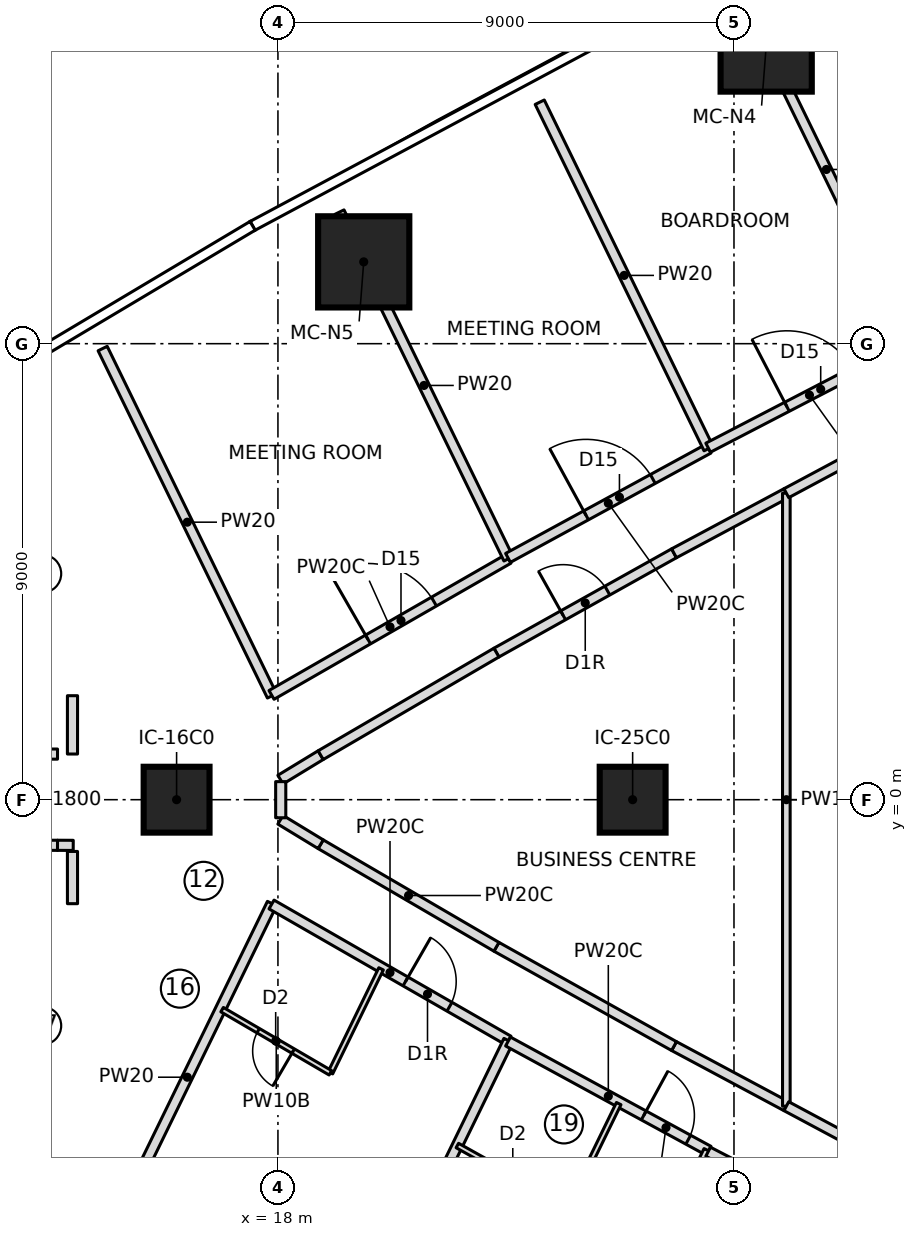
"""IFC4 building model, lengths in metres.
Left out: names, types, materials, properties, quantities, classifications, styles, units other than length and angle.
Written with IfcOpenShell. Run it as: python <this file> out.ifc"""

import sys

from ifc_helpers import new_model, si_unit, direction, frame, frame_2d, origin, origin_2d, place, context, subcontext, project, spatial, rectangle, extrude, element, fill, save


model = new_model("IFC4")
c1 = context("Model", 3, precision=1e-05, world=origin(), true_north=direction((0.0, 1.0)))
c2 = subcontext(c1, "Body", "Model", "MODEL_VIEW")
j1 = project(units=[si_unit("LENGTHUNIT", "METRE"), si_unit("PLANEANGLEUNIT", "RADIAN")], contexts=[c1])
p1 = place(None, origin())
s1 = spatial("IfcSite", under=j1, at=p1, CompositionType="ELEMENT")
p2 = place(p1, origin())
s2 = spatial("IfcBuilding", under=s1, at=p2, CompositionType="ELEMENT")
p3 = place(p2, frame((0.0, 0.0, 46.7)))
s3 = spatial("IfcBuildingStorey", under=s2, at=p3, CompositionType="ELEMENT", Elevation=46.7)
for number, where, z_axis, x_axis in (
    (1, (27.635, 14.874, 0.0), (0.0, 0.0, 1.0), (1.0, 0.0, 0.0)),
    (2, (19.693, 10.615, 0.0), (0.0, 0.0, 1.0), (1.0, 0.0, 0.0)),
):
    element("IfcColumn", number, at=place(p3, frame(where, z_axis=z_axis, x_axis=x_axis)), inside=s3, PredefinedType="COLUMN", context=c2, shape_type="SweptSolid", body=[
        extrude(rectangle(XDim=1.8, YDim=1.8, at=origin_2d()), origin(), (0.0, 0.0, 1.0), 3.55),
    ])
for number, where, z_axis, x_axis in (
    (3, (16.0, 0.0, 0.0), (0.0, 0.0, 1.0), (1.0, 0.0, 0.0)),
    (4, (25.0, 0.0, 0.0), (0.0, 0.0, 1.0), (1.0, 0.0, 0.0)),
):
    element("IfcColumn", number, at=place(p3, frame(where, z_axis=z_axis, x_axis=x_axis)), inside=s3, PredefinedType="COLUMN", context=c2, shape_type="SweptSolid", body=[
        extrude(rectangle(XDim=1.3, YDim=1.3, at=origin_2d()), origin(), (0.0, 0.0, 1.0), 3.55),
    ])
p4 = place(p3, frame((17.882, 2.05, 0.0), z_axis=(0.0, 0.0, 1.0), x_axis=(-0.438213564788, 0.898870887078, 0.0)))
e5 = element("IfcWall", 5, at=p4, inside=s3, PredefinedType="PARTITIONING", context=c2, shape_type="SweptSolid", body=[
    extrude(rectangle(XDim=7.625, YDim=0.2, at=frame_2d((3.813, 0.0))), origin(), (0.0, 0.0, 1.0), 3.25),
])
p5 = place(p3, frame((17.874, 2.068, 0.0), z_axis=(0.0, 0.0, 1.0), x_axis=(0.867093061484, 0.4981461861, 0.0)))
e6 = element("IfcWall", 6, at=p5, inside=s3, PredefinedType="PARTITIONING", context=c2, shape_type="SweptSolid", body=[
    extrude(rectangle(XDim=5.393, YDim=0.2, at=frame_2d((2.697, 0.0))), origin(), (0.0, 0.0, 1.0), 3.25),
])
p6 = place(p5, frame((2.197, 0.0, 0.0)))
e7 = element("IfcOpeningElement", 7, at=p6, cuts=e6, PredefinedType="OPENING", context=c2, shape_type="SweptSolid", body=[
    extrude(rectangle(XDim=1.5, YDim=2.1, at=frame_2d((0.75, 1.05))), frame((0.0, 0.11, 0.0), z_axis=(0.0, -1.0, 0.0), x_axis=(1.0, 0.0, 0.0)), (0.0, 0.0, 1.0), 0.22),
])
p7 = place(p3, frame((22.55, 4.755, 0.0), z_axis=(0.0, 0.0, 1.0), x_axis=(-0.438210669268, 0.898872298683, 0.0)))
e8 = element("IfcWall", 8, at=p7, inside=s3, PredefinedType="PARTITIONING", context=c2, shape_type="SweptSolid", body=[
    extrude(rectangle(XDim=7.612, YDim=0.2, at=frame_2d((3.806, 0.0))), origin(), (0.0, 0.0, 1.0), 3.25),
])
p8 = place(p3, frame((22.541, 4.773, 0.0), z_axis=(0.0, 0.0, 1.0), x_axis=(0.878098348451, 0.478480188146, 0.0)))
e9 = element("IfcWall", 9, at=p8, inside=s3, PredefinedType="PARTITIONING", context=c2, shape_type="SweptSolid", body=[
    extrude(rectangle(XDim=4.508, YDim=0.2, at=frame_2d((2.254, 0.0))), origin(), (0.0, 0.0, 1.0), 3.25),
])
p9 = place(p8, frame((1.754, 0.0, 0.0)))
e10 = element("IfcOpeningElement", 10, at=p9, cuts=e9, PredefinedType="OPENING", context=c2, shape_type="SweptSolid", body=[
    extrude(rectangle(XDim=1.5, YDim=2.1, at=frame_2d((0.75, 1.05))), frame((0.0, 0.11, 0.0), z_axis=(0.0, -1.0, 0.0), x_axis=(1.0, 0.0, 0.0)), (0.0, 0.0, 1.0), 0.22),
])
p10 = place(p3, frame((26.499, 6.929, 0.0), z_axis=(0.0, 0.0, 1.0), x_axis=(-0.438215539964, 0.898869924146, 0.0)))
e11 = element("IfcWall", 11, at=p10, inside=s3, PredefinedType="PARTITIONING", context=c2, shape_type="SweptSolid", body=[
    extrude(rectangle(XDim=7.605, YDim=0.2, at=frame_2d((3.803, 0.0))), origin(), (0.0, 0.0, 1.0), 3.25),
])
p11 = place(p3, frame((26.49, 6.948, 0.0), z_axis=(0.0, 0.0, 1.0), x_axis=(0.887638836985, 0.460540220911, 0.0)))
e12 = element("IfcWall", 12, at=p11, inside=s3, PredefinedType="PARTITIONING", context=c2, shape_type="SweptSolid", body=[
    extrude(rectangle(XDim=4.504, YDim=0.2, at=frame_2d((2.252, 0.0))), origin(), (0.0, 0.0, 1.0), 3.25),
])
p12 = place(p11, frame((1.752, 0.0, 0.0)))
e13 = element("IfcOpeningElement", 13, at=p12, cuts=e12, PredefinedType="OPENING", context=c2, shape_type="SweptSolid", body=[
    extrude(rectangle(XDim=1.5, YDim=2.1, at=frame_2d((0.75, 1.05))), frame((0.0, 0.11, 0.0), z_axis=(0.0, -1.0, 0.0), x_axis=(1.0, 0.0, 0.0)), (0.0, 0.0, 1.0), 0.22),
])
p13 = place(p3, frame((30.489, 9.022, 0.0), z_axis=(0.0, 0.0, 1.0), x_axis=(-0.43822365664, 0.898865967072, 0.0)))
e14 = element("IfcWall", 14, at=p13, inside=s3, PredefinedType="PARTITIONING", context=c2, shape_type="SweptSolid", body=[
    extrude(rectangle(XDim=7.601, YDim=0.2, at=frame_2d((3.801, 0.0))), origin(), (0.0, 0.0, 1.0), 3.25),
])
p14 = place(p3, frame((14.541, -8.904, 0.0), z_axis=(0.0, 0.0, 1.0), x_axis=(0.438213564788, 0.898870887078, 0.0)))
e15 = element("IfcWall", 15, at=p14, inside=s3, PredefinedType="PARTITIONING", context=c2, shape_type="SweptSolid", body=[
    extrude(rectangle(XDim=7.625, YDim=0.2, at=frame_2d((3.813, 0.0))), origin(), (0.0, 0.0, 1.0), 3.25),
])
p15 = place(p3, frame((17.874, -2.068, 0.0), z_axis=(0.0, 0.0, 1.0), x_axis=(0.867093061484, -0.4981461861, 0.0)))
e16 = element("IfcWall", 16, at=p15, inside=s3, PredefinedType="PARTITIONING", context=c2, shape_type="SweptSolid", body=[
    extrude(rectangle(XDim=5.393, YDim=0.2, at=frame_2d((2.697, 0.0))), origin(), (0.0, 0.0, 1.0), 3.25),
])
p16 = place(p15, frame((3.05, 0.0, 0.0)))
e17 = element("IfcOpeningElement", 17, at=p16, cuts=e16, PredefinedType="OPENING", context=c2, shape_type="SweptSolid", body=[
    extrude(rectangle(XDim=1.0, YDim=2.1, at=frame_2d((0.5, 1.05))), frame((0.0, 0.11, 0.0), z_axis=(0.0, -1.0, 0.0), x_axis=(1.0, 0.0, 0.0)), (0.0, 0.0, 1.0), 0.22),
])
p17 = place(p3, frame((20.035, -3.338, 0.0), z_axis=(0.0, 0.0, 1.0), x_axis=(-0.438122322582, -0.898915363344, 0.0)))
e18 = element("IfcWall", 18, at=p17, inside=s3, PredefinedType="PARTITIONING", context=c2, shape_type="SweptSolid", body=[
    extrude(rectangle(XDim=2.283, YDim=0.1, at=frame_2d((1.142, 0.0))), origin(), (0.0, 0.0, 1.0), 3.25),
])
p18 = place(p3, frame((19.035, -5.39, 0.0), z_axis=(0.0, 0.0, 1.0), x_axis=(-0.863707305865, 0.503993739837, 0.0)))
e19 = element("IfcWall", 19, at=p18, inside=s3, PredefinedType="PARTITIONING", context=c2, shape_type="SweptSolid", body=[
    extrude(rectangle(XDim=2.474, YDim=0.1, at=frame_2d((1.237, 0.0))), origin(), (0.0, 0.0, 1.0), 3.25),
])
p19 = place(p18, frame((0.85, 0.0, 0.0)))
e20 = element("IfcOpeningElement", 20, at=p19, cuts=e19, PredefinedType="OPENING", context=c2, shape_type="SweptSolid", body=[
    extrude(rectangle(XDim=0.8, YDim=2.1, at=frame_2d((0.4, 1.05))), frame((0.0, 0.06, 0.0), z_axis=(0.0, -1.0, 0.0), x_axis=(1.0, 0.0, 0.0)), (0.0, 0.0, 1.0), 0.12),
])
p20 = place(p3, frame((19.214, -11.597, 0.0), z_axis=(0.0, 0.0, 1.0), x_axis=(0.438210669268, 0.898872298683, 0.0)))
e21 = element("IfcWall", 21, at=p20, inside=s3, PredefinedType="PARTITIONING", context=c2, shape_type="SweptSolid", body=[
    extrude(rectangle(XDim=7.612, YDim=0.2, at=frame_2d((3.806, 0.0))), origin(), (0.0, 0.0, 1.0), 3.25),
])
p21 = place(p3, frame((22.541, -4.773, 0.0), z_axis=(0.0, 0.0, 1.0), x_axis=(0.878098348451, -0.478480188146, 0.0)))
e22 = element("IfcWall", 22, at=p21, inside=s3, PredefinedType="PARTITIONING", context=c2, shape_type="SweptSolid", body=[
    extrude(rectangle(XDim=4.508, YDim=0.2, at=frame_2d((2.254, 0.0))), origin(), (0.0, 0.0, 1.0), 3.25),
])
p22 = place(p21, frame((3.05, 0.0, 0.0)))
e23 = element("IfcOpeningElement", 23, at=p22, cuts=e22, PredefinedType="OPENING", context=c2, shape_type="SweptSolid", body=[
    extrude(rectangle(XDim=1.0, YDim=2.1, at=frame_2d((0.5, 1.05))), frame((0.0, 0.11, 0.0), z_axis=(0.0, -1.0, 0.0), x_axis=(1.0, 0.0, 0.0)), (0.0, 0.0, 1.0), 0.22),
])
p23 = place(p3, frame((24.725, -5.998, 0.0), z_axis=(0.0, 0.0, 1.0), x_axis=(-0.438197922062, -0.898878512982, 0.0)))
e24 = element("IfcWall", 24, at=p23, inside=s3, PredefinedType="PARTITIONING", context=c2, shape_type="SweptSolid", body=[
    extrude(rectangle(XDim=2.281, YDim=0.1, at=frame_2d((1.14, 0.0))), origin(), (0.0, 0.0, 1.0), 3.25),
])
p24 = place(p3, frame((23.726, -8.047, 0.0), z_axis=(0.0, 0.0, 1.0), x_axis=(-0.872778565067, 0.488116355349, 0.0)))
e25 = element("IfcWall", 25, at=p24, inside=s3, PredefinedType="PARTITIONING", context=c2, shape_type="SweptSolid", body=[
    extrude(rectangle(XDim=2.504, YDim=0.1, at=frame_2d((1.252, 0.0))), origin(), (0.0, 0.0, 1.0), 3.25),
])
p25 = place(p24, frame((0.85, 0.0, 0.0)))
e26 = element("IfcOpeningElement", 26, at=p25, cuts=e25, PredefinedType="OPENING", context=c2, shape_type="SweptSolid", body=[
    extrude(rectangle(XDim=0.8, YDim=2.1, at=frame_2d((0.4, 1.05))), frame((0.0, 0.06, 0.0), z_axis=(0.0, -1.0, 0.0), x_axis=(1.0, 0.0, 0.0)), (0.0, 0.0, 1.0), 0.12),
])
p26 = place(p3, frame((23.166, -13.766, 0.0), z_axis=(0.0, 0.0, 1.0), x_axis=(0.438215539964, 0.898869924146, 0.0)))
e27 = element("IfcWall", 27, at=p26, inside=s3, PredefinedType="PARTITIONING", context=c2, shape_type="SweptSolid", body=[
    extrude(rectangle(XDim=7.605, YDim=0.2, at=frame_2d((3.803, 0.0))), origin(), (0.0, 0.0, 1.0), 3.25),
])
p27 = place(p3, frame((26.49, -6.948, 0.0), z_axis=(0.0, 0.0, 1.0), x_axis=(0.887638836985, -0.460540220911, 0.0)))
e28 = element("IfcWall", 28, at=p27, inside=s3, PredefinedType="PARTITIONING", context=c2, shape_type="SweptSolid", body=[
    extrude(rectangle(XDim=4.504, YDim=0.2, at=frame_2d((2.252, 0.0))), origin(), (0.0, 0.0, 1.0), 3.25),
])
p28 = place(p27, frame((3.05, 0.0, 0.0)))
e29 = element("IfcOpeningElement", 29, at=p28, cuts=e28, PredefinedType="OPENING", context=c2, shape_type="SweptSolid", body=[
    extrude(rectangle(XDim=1.0, YDim=2.1, at=frame_2d((0.5, 1.05))), frame((0.0, 0.11, 0.0), z_axis=(0.0, -1.0, 0.0), x_axis=(1.0, 0.0, 0.0)), (0.0, 0.0, 1.0), 0.22),
])
p29 = place(p3, frame((22.312, 2.903, 0.0), z_axis=(0.0, 0.0, 1.0), x_axis=(0.872800289292, 0.488077509225, 0.0)))
e30 = element("IfcWall", 30, at=p29, inside=s3, PredefinedType="PARTITIONING", context=c2, shape_type="SweptSolid", body=[
    extrude(rectangle(XDim=4.016, YDim=0.2, at=frame_2d((2.008, 0.0))), origin(), (0.0, 0.0, 1.0), 3.25),
])
p30 = place(p29, frame((1.508, 0.0, 0.0)))
e31 = element("IfcOpeningElement", 31, at=p30, cuts=e30, PredefinedType="OPENING", context=c2, shape_type="SweptSolid", body=[
    extrude(rectangle(XDim=1.0, YDim=2.1, at=frame_2d((0.5, 1.05))), frame((0.0, 0.11, 0.0), z_axis=(0.0, -1.0, 0.0), x_axis=(1.0, 0.0, 0.0)), (0.0, 0.0, 1.0), 0.22),
])
p31 = place(p3, frame((28.033, -6.049, 0.0), z_axis=(0.0, 0.0, 1.0), x_axis=(-0.881650280758, 0.471903361335, 0.0)))
e32 = element("IfcWall", 32, at=p31, inside=s3, PredefinedType="PARTITIONING", context=c2, shape_type="SweptSolid", body=[
    extrude(rectangle(XDim=2.514, YDim=0.2, at=frame_2d((1.257, 0.0))), origin(), (0.0, 0.0, 1.0), 3.25),
])
p32 = place(p3, frame((25.817, -4.863, 0.0), z_axis=(0.0, 0.0, 1.0), x_axis=(-0.872800289292, 0.488077509225, 0.0)))
e33 = element("IfcWall", 33, at=p32, inside=s3, PredefinedType="PARTITIONING", context=c2, shape_type="SweptSolid", body=[
    extrude(rectangle(XDim=4.016, YDim=0.2, at=frame_2d((2.008, 0.0))), origin(), (0.0, 0.0, 1.0), 3.25),
])
p33 = place(p3, frame((22.312, -2.903, 0.0), z_axis=(0.0, 0.0, 1.0), x_axis=(-0.863710538269, 0.503988200341, 0.0)))
e34 = element("IfcWall", 34, at=p33, inside=s3, PredefinedType="PARTITIONING", context=c2, shape_type="SweptSolid", body=[
    extrude(rectangle(XDim=4.016, YDim=0.2, at=frame_2d((2.008, 0.0))), origin(), (0.0, 0.0, 1.0), 3.25),
])
for number, where, z_axis, x_axis in (
    (35, (18.844, -0.879, 0.0), (0.0, 0.0, 1.0), (-0.854, 0.52, 0.0)),
    (36, (18.05, 0.396, 0.0), (0.0, 0.0, 1.0), (0.854, 0.52, 0.0)),
):
    element("IfcWall", number, at=place(p3, frame(where, z_axis=z_axis, x_axis=x_axis)), inside=s3, PredefinedType="PARTITIONING", context=c2, shape_type="SweptSolid", body=[
        extrude(rectangle(XDim=0.929, YDim=0.2, at=frame_2d((0.464, 0.0))), origin(), (0.0, 0.0, 1.0), 3.25),
    ])
p34 = place(p3, frame((18.844, 0.879, 0.0), z_axis=(0.0, 0.0, 1.0), x_axis=(0.863710538269, 0.503988200341, 0.0)))
e37 = element("IfcWall", 37, at=p34, inside=s3, PredefinedType="PARTITIONING", context=c2, shape_type="SweptSolid", body=[
    extrude(rectangle(XDim=4.016, YDim=0.2, at=frame_2d((2.008, 0.0))), origin(), (0.0, 0.0, 1.0), 3.25),
])
p35 = place(p3, frame((25.817, 4.863, 0.0), z_axis=(0.0, 0.0, 1.0), x_axis=(0.881650280758, 0.471903361335, 0.0)))
e38 = element("IfcWall", 38, at=p35, inside=s3, PredefinedType="PARTITIONING", context=c2, shape_type="SweptSolid", body=[
    extrude(rectangle(XDim=2.514, YDim=0.2, at=frame_2d((1.257, 0.0))), origin(), (0.0, 0.0, 1.0), 3.25),
])
p36 = place(p3, frame((28.033, -6.049, 0.0), z_axis=(0.0, 0.0, 1.0), x_axis=(0.0, 1.0, 0.0)))
e39 = element("IfcWall", 39, at=p36, inside=s3, PredefinedType="PARTITIONING", context=c2, shape_type="SweptSolid", body=[
    extrude(rectangle(XDim=12.099, YDim=0.15, at=frame_2d((6.049, 0.0))), origin(), (0.0, 0.0, 1.0), 3.25),
])
for number, where, z_axis, x_axis in (
    (40, (29.357, -6.758, 0.0), (0.0, 0.0, 1.0), (-0.882, 0.472, 0.0)),
    (41, (28.033, 6.049, 0.0), (0.0, 0.0, 1.0), (0.882, 0.472, 0.0)),
):
    element("IfcWall", number, at=place(p3, frame(where, z_axis=z_axis, x_axis=x_axis)), inside=s3, PredefinedType="PARTITIONING", context=c2, shape_type="SweptSolid", body=[
        extrude(rectangle(XDim=1.502, YDim=0.2, at=frame_2d((0.751, 0.0))), origin(), (0.0, 0.0, 1.0), 3.25),
    ])
p37 = place(p3, frame((11.327, 0.9, 0.0), z_axis=(0.0, 0.0, 1.0), x_axis=(1.0, 0.0, 0.0)))
e42 = element("IfcWall", 42, at=p37, inside=s3, PredefinedType="PARTITIONING", context=c2, shape_type="SweptSolid", body=[
    extrude(rectangle(XDim=2.323, YDim=0.2, at=frame_2d((1.161, 0.0))), origin(), (0.0, 0.0, 1.0), 3.25),
])
p38 = place(p37, frame((0.995, 0.0, 0.0)))
e43 = element("IfcOpeningElement", 43, at=p38, cuts=e42, PredefinedType="OPENING", context=c2, shape_type="SweptSolid", body=[
    extrude(rectangle(XDim=1.0, YDim=2.1, at=frame_2d((0.5, 1.05))), frame((0.0, 0.11, 0.0), z_axis=(0.0, -1.0, 0.0), x_axis=(1.0, 0.0, 0.0)), (0.0, 0.0, 1.0), 0.22),
])
p39 = place(p3, frame((11.327, -0.9, 0.0), z_axis=(0.0, 0.0, 1.0), x_axis=(1.0, 0.0, 0.0)))
e44 = element("IfcWall", 44, at=p39, inside=s3, PredefinedType="PARTITIONING", context=c2, shape_type="SweptSolid", body=[
    extrude(rectangle(XDim=2.323, YDim=0.2, at=frame_2d((1.161, 0.0))), origin(), (0.0, 0.0, 1.0), 3.25),
])
p40 = place(p39, frame((0.995, 0.0, 0.0)))
e45 = element("IfcOpeningElement", 45, at=p40, cuts=e44, PredefinedType="OPENING", context=c2, shape_type="SweptSolid", body=[
    extrude(rectangle(XDim=1.0, YDim=2.1, at=frame_2d((0.5, 1.05))), frame((0.0, 0.11, 0.0), z_axis=(0.0, -1.0, 0.0), x_axis=(1.0, 0.0, 0.0)), (0.0, 0.0, 1.0), 0.22),
])
p41 = place(p3, frame((18.055, -0.357, 0.0), z_axis=(0.0, 0.0, 1.0), x_axis=(0.0, 1.0, 0.0)))
e46 = element("IfcWall", 46, at=p41, inside=s3, PredefinedType="PARTITIONING", context=c2, shape_type="SweptSolid", body=[
    extrude(rectangle(XDim=0.713, YDim=0.2, at=frame_2d((0.357, 0.0))), origin(), (0.0, 0.0, 1.0), 3.25),
])
p42 = place(p3, frame((13.946, 2.052, 0.0), z_axis=(0.0, 0.0, 1.0), x_axis=(-0.000424178117, -0.999999910036, 0.0)))
e47 = element("IfcWall", 47, at=p42, inside=s3, PredefinedType="PARTITIONING", context=c2, shape_type="SweptSolid", body=[
    extrude(rectangle(XDim=1.151, YDim=0.2, at=frame_2d((0.576, 0.0))), origin(), (0.0, 0.0, 1.0), 3.25),
])
p43 = place(p3, frame((13.65, -0.9, 0.0), z_axis=(0.0, 0.0, 1.0), x_axis=(0.999984810316, -0.005511727301, 0.0)))
e48 = element("IfcWall", 48, at=p43, inside=s3, PredefinedType="PARTITIONING", context=c2, shape_type="SweptSolid", body=[
    extrude(rectangle(XDim=0.31, YDim=0.2, at=frame_2d((0.155, 0.0))), origin(), (0.0, 0.0, 1.0), 3.25),
])
p44 = place(p3, frame((13.945, -1.021, 0.0), z_axis=(0.0, 0.0, 1.0), x_axis=(0.000473596916, -0.999999887853, 0.0)))
e49 = element("IfcWall", 49, at=p44, inside=s3, PredefinedType="PARTITIONING", context=c2, shape_type="SweptSolid", body=[
    extrude(rectangle(XDim=1.031, YDim=0.2, at=frame_2d((0.516, 0.0))), origin(), (0.0, 0.0, 1.0), 3.25),
])
p45 = place(p6, origin())
e50 = element("IfcDoor", 50, at=p45, inside=s3, OperationType="DOUBLE_DOOR_SINGLE_SWING", PredefinedType="DOOR", context=c2, shape_type="SweptSolid", body=[
    extrude(rectangle(XDim=1.5, YDim=2.1, at=frame_2d((0.75, 1.05))), frame((0.0, 0.025, 0.0), z_axis=(0.0, -1.0, 0.0), x_axis=(1.0, 0.0, 0.0)), (0.0, 0.0, 1.0), 0.05),
])
fill(e7, e50)
p46 = place(p9, origin())
e51 = element("IfcDoor", 51, at=p46, inside=s3, OperationType="DOUBLE_DOOR_SINGLE_SWING", PredefinedType="DOOR", context=c2, shape_type="SweptSolid", body=[
    extrude(rectangle(XDim=1.5, YDim=2.1, at=frame_2d((0.75, 1.05))), frame((0.0, 0.025, 0.0), z_axis=(0.0, -1.0, 0.0), x_axis=(1.0, 0.0, 0.0)), (0.0, 0.0, 1.0), 0.05),
])
fill(e10, e51)
p47 = place(p12, origin())
e52 = element("IfcDoor", 52, at=p47, inside=s3, OperationType="DOUBLE_DOOR_SINGLE_SWING", PredefinedType="DOOR", context=c2, shape_type="SweptSolid", body=[
    extrude(rectangle(XDim=1.5, YDim=2.1, at=frame_2d((0.75, 1.05))), frame((0.0, 0.025, 0.0), z_axis=(0.0, -1.0, 0.0), x_axis=(1.0, 0.0, 0.0)), (0.0, 0.0, 1.0), 0.05),
])
fill(e13, e52)
p48 = place(p19, origin())
e53 = element("IfcDoor", 53, at=p48, inside=s3, OperationType="SINGLE_SWING_LEFT", PredefinedType="DOOR", context=c2, shape_type="SweptSolid", body=[
    extrude(rectangle(XDim=0.8, YDim=2.1, at=frame_2d((0.4, 1.05))), frame((0.0, 0.025, 0.0), z_axis=(0.0, -1.0, 0.0), x_axis=(1.0, 0.0, 0.0)), (0.0, 0.0, 1.0), 0.05),
])
fill(e20, e53)
p49 = place(p16, origin())
e54 = element("IfcDoor", 54, at=p49, inside=s3, OperationType="SINGLE_SWING_RIGHT", PredefinedType="DOOR", context=c2, shape_type="SweptSolid", body=[
    extrude(rectangle(XDim=1.0, YDim=2.1, at=frame_2d((0.5, 1.05))), frame((0.0, 0.025, 0.0), z_axis=(0.0, -1.0, 0.0), x_axis=(1.0, 0.0, 0.0)), (0.0, 0.0, 1.0), 0.05),
])
fill(e17, e54)
p50 = place(p22, origin())
e55 = element("IfcDoor", 55, at=p50, inside=s3, OperationType="SINGLE_SWING_RIGHT", PredefinedType="DOOR", context=c2, shape_type="SweptSolid", body=[
    extrude(rectangle(XDim=1.0, YDim=2.1, at=frame_2d((0.5, 1.05))), frame((0.0, 0.025, 0.0), z_axis=(0.0, -1.0, 0.0), x_axis=(1.0, 0.0, 0.0)), (0.0, 0.0, 1.0), 0.05),
])
fill(e23, e55)
p51 = place(p30, origin())
e56 = element("IfcDoor", 56, at=p51, inside=s3, OperationType="SINGLE_SWING_RIGHT", PredefinedType="DOOR", context=c2, shape_type="SweptSolid", body=[
    extrude(rectangle(XDim=1.0, YDim=2.1, at=frame_2d((0.5, 1.05))), frame((0.0, 0.025, 0.0), z_axis=(0.0, -1.0, 0.0), x_axis=(1.0, 0.0, 0.0)), (0.0, 0.0, 1.0), 0.05),
])
fill(e31, e56)
save(model, sys.argv[1])
